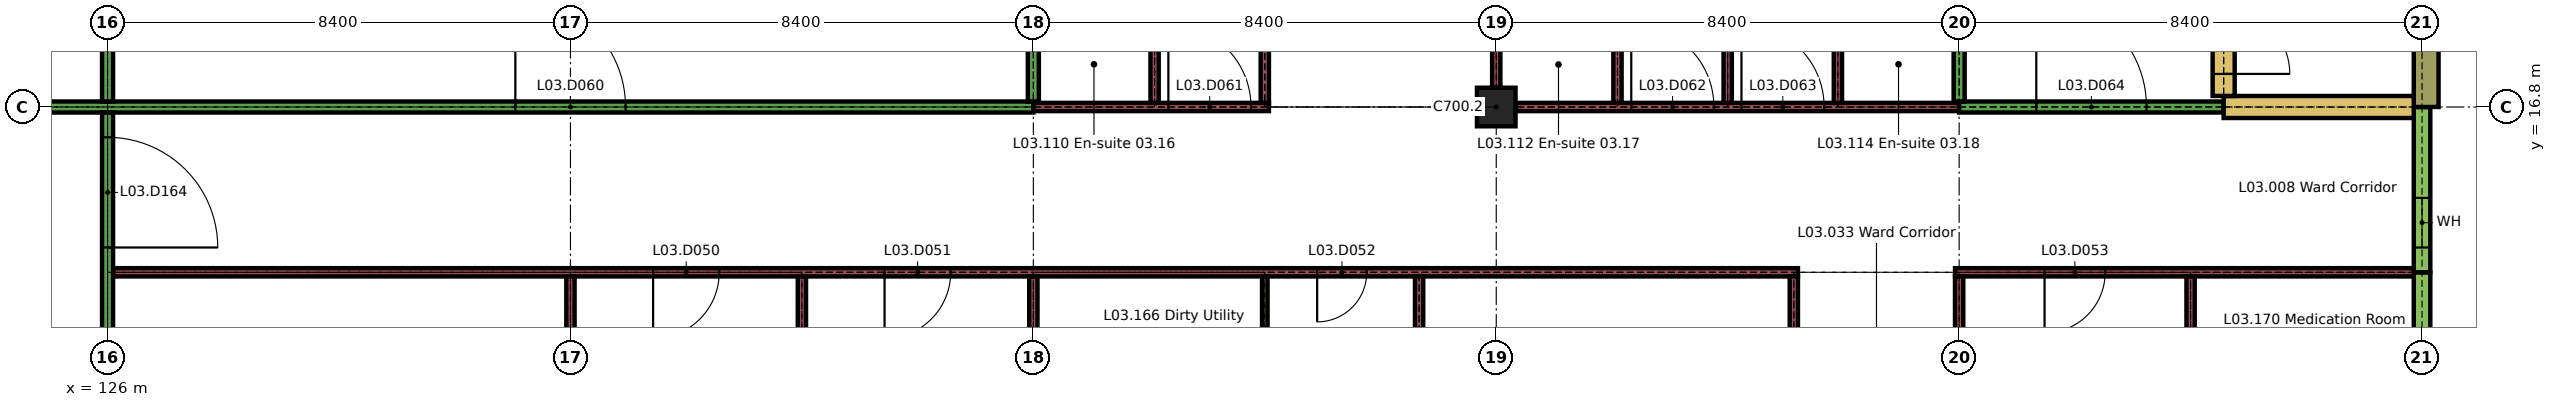
"""IFC4 building model, lengths in metres.
Left out: names, types, materials, properties, quantities, classifications, styles, units other than length and angle.
Written with IfcOpenShell. Run it as: python <this file> out.ifc"""

import sys

from ifc_helpers import new_model, si_unit, direction, frame, frame_2d, origin, origin_2d, place, context, subcontext, project, spatial, rectangle, extrude, element, fill, save


model = new_model("IFC4")
c1 = context("Model", 3, precision=1e-05, world=origin(), true_north=direction((0.0, 1.0)))
c2 = subcontext(c1, "Body", "Model", "MODEL_VIEW")
j1 = project(units=[si_unit("LENGTHUNIT", "METRE"), si_unit("PLANEANGLEUNIT", "RADIAN")], contexts=[c1])
p1 = place(None, origin())
s1 = spatial("IfcSite", under=j1, at=p1, CompositionType="ELEMENT")
p2 = place(p1, origin())
s2 = spatial("IfcBuilding", under=s1, at=p2, CompositionType="ELEMENT")
p3 = place(p2, frame((0.0, 0.0, 15.3)))
s3 = spatial("IfcBuildingStorey", under=s2, at=p3, CompositionType="ELEMENT", Elevation=15.3)
p4 = place(p3, frame((151.2, 16.8, 0.0), z_axis=(0.0, 0.0, 1.0), x_axis=(1.0, 0.0, 0.0)))
e1 = element("IfcColumn", 1, at=p4, inside=s3, PredefinedType="COLUMN", context=c2, shape_type="SweptSolid", body=[
    extrude(rectangle(XDim=0.7, YDim=0.7, at=origin_2d()), origin(), (0.0, 0.0, 1.0), 3.26),
])
p5 = place(p3, frame((168.0, 11.4, 0.0), z_axis=(0.0, 0.0, 1.0), x_axis=(0.0, 1.0, 0.0)))
e2 = element("IfcWall", 2, at=p5, inside=s3, PredefinedType="SOLIDWALL", context=c2, shape_type="SweptSolid", body=[
    extrude(rectangle(XDim=2.4, YDim=0.3, at=frame_2d((1.2, 0.0))), origin(), (0.0, 0.0, 1.0), 2.96),
])
p6 = place(p3, frame((168.0, 13.8, 0.0), z_axis=(0.0, 0.0, 1.0), x_axis=(0.0, 1.0, 0.0)))
e3 = element("IfcWall", 3, at=p6, inside=s3, PredefinedType="SOLIDWALL", context=c2, shape_type="SweptSolid", body=[
    extrude(rectangle(XDim=3.0, YDim=0.3, at=frame_2d((1.5, 0.0))), origin(), (0.0, 0.0, 1.0), 2.96),
])
p7 = place(p6, frame((0.45, 0.0, 0.9)))
e4 = element("IfcOpeningElement", 4, at=p7, cuts=e3, PredefinedType="OPENING", context=c2, shape_type="SweptSolid", body=[
    extrude(rectangle(XDim=0.9, YDim=1.5, at=frame_2d((0.45, 0.75))), frame((0.0, 0.16, 0.0), z_axis=(0.0, -1.0, 0.0), x_axis=(1.0, 0.0, 0.0)), (0.0, 0.0, 1.0), 0.32),
])
p8 = place(p3, frame((168.075, 16.8, 0.0), z_axis=(0.0, 0.0, 1.0), x_axis=(0.0, 1.0, 0.0)))
e5 = element("IfcWall", 5, at=p8, inside=s3, PredefinedType="SOLIDWALL", context=c2, shape_type="SweptSolid", body=[
    extrude(rectangle(XDim=3.15, YDim=0.45, at=frame_2d((1.575, 0.0))), origin(), (0.0, 0.0, 1.0), 3.26),
])
p9 = place(p3, frame((126.1, 13.8, 0.0), z_axis=(0.0, 0.0, 1.0), x_axis=(1.0, 0.0, 0.0)))
e6 = element("IfcWall", 6, at=p9, inside=s3, PredefinedType="PARTITIONING", context=c2, shape_type="SweptSolid", body=[
    extrude(rectangle(XDim=30.575, YDim=0.15, at=frame_2d((15.288, 0.0))), origin(), (0.0, 0.0, 1.0), 3.26),
])
p10 = place(p9, frame((9.8, 0.0, 0.0)))
e7 = element("IfcOpeningElement", 7, at=p10, cuts=e6, PredefinedType="OPENING", context=c2, shape_type="SweptSolid", body=[
    extrude(rectangle(XDim=1.2, YDim=2.1, at=frame_2d((0.6, 1.05))), frame((0.0, 0.085, 0.0), z_axis=(0.0, -1.0, 0.0), x_axis=(1.0, 0.0, 0.0)), (0.0, 0.0, 1.0), 0.17),
])
p11 = place(p9, frame((14.0, 0.0, 0.0)))
e8 = element("IfcOpeningElement", 8, at=p11, cuts=e6, PredefinedType="OPENING", context=c2, shape_type="SweptSolid", body=[
    extrude(rectangle(XDim=1.2, YDim=2.1, at=frame_2d((0.6, 1.05))), frame((0.0, 0.085, 0.0), z_axis=(0.0, -1.0, 0.0), x_axis=(1.0, 0.0, 0.0)), (0.0, 0.0, 1.0), 0.17),
])
p12 = place(p9, frame((21.85, 0.0, 0.0)))
e9 = element("IfcOpeningElement", 9, at=p12, cuts=e6, PredefinedType="OPENING", context=c2, shape_type="SweptSolid", body=[
    extrude(rectangle(XDim=0.9, YDim=2.1, at=frame_2d((0.45, 1.05))), frame((0.0, 0.085, 0.0), z_axis=(0.0, -1.0, 0.0), x_axis=(1.0, 0.0, 0.0)), (0.0, 0.0, 1.0), 0.17),
])
p13 = place(p3, frame((159.525, 13.8, 0.0), z_axis=(0.0, 0.0, 1.0), x_axis=(1.0, 0.0, 0.0)))
e10 = element("IfcWall", 10, at=p13, inside=s3, PredefinedType="PARTITIONING", context=c2, shape_type="SweptSolid", body=[
    extrude(rectangle(XDim=8.325, YDim=0.15, at=frame_2d((4.163, 0.0))), origin(), (0.0, 0.0, 1.0), 3.26),
])
p14 = place(p13, frame((1.625, 0.0, 0.0)))
e11 = element("IfcOpeningElement", 11, at=p14, cuts=e10, PredefinedType="OPENING", context=c2, shape_type="SweptSolid", body=[
    extrude(rectangle(XDim=1.1, YDim=2.1, at=frame_2d((0.55, 1.05))), frame((0.0, 0.085, 0.0), z_axis=(0.0, -1.0, 0.0), x_axis=(1.0, 0.0, 0.0)), (0.0, 0.0, 1.0), 0.17),
])
p15 = place(p3, frame((117.7, 16.8, 0.0), z_axis=(0.0, 0.0, 1.0), x_axis=(1.0, 0.0, 0.0)))
e12 = element("IfcWall", 12, at=p15, inside=s3, PredefinedType="PARTITIONING", context=c2, shape_type="SweptSolid", body=[
    extrude(rectangle(XDim=25.1, YDim=0.2, at=frame_2d((12.55, 0.0))), origin(), (0.0, 0.0, 1.0), 3.26),
])
p16 = place(p15, frame((3.3, 0.0, 0.0)))
e13 = element("IfcOpeningElement", 13, at=p16, cuts=e12, PredefinedType="OPENING", context=c2, shape_type="SweptSolid", body=[
    extrude(rectangle(XDim=1.7, YDim=2.4, at=frame_2d((0.85, 1.2))), frame((0.0, 0.11, 0.0), z_axis=(0.0, -1.0, 0.0), x_axis=(1.0, 0.0, 0.0)), (0.0, 0.0, 1.0), 0.22),
])
p17 = place(p15, frame((15.7, 0.0, 0.0)))
e14 = element("IfcOpeningElement", 14, at=p17, cuts=e12, PredefinedType="OPENING", context=c2, shape_type="SweptSolid", body=[
    extrude(rectangle(XDim=2.0, YDim=2.4, at=frame_2d((1.0, 1.2))), frame((0.0, 0.11, 0.0), z_axis=(0.0, -1.0, 0.0), x_axis=(1.0, 0.0, 0.0)), (0.0, 0.0, 1.0), 0.22),
])
p18 = place(p3, frame((142.8, 16.8, 0.0), z_axis=(0.0, 0.0, 1.0), x_axis=(1.0, 0.0, 0.0)))
e15 = element("IfcWall", 15, at=p18, inside=s3, PredefinedType="PARTITIONING", context=c2, shape_type="SweptSolid", body=[
    extrude(rectangle(XDim=4.275, YDim=0.15, at=frame_2d((2.137, 0.0))), origin(), (0.0, 0.0, 1.0), 3.26),
])
p19 = place(p18, frame((2.45, 0.0, 0.0)))
e16 = element("IfcOpeningElement", 16, at=p19, cuts=e15, PredefinedType="OPENING", context=c2, shape_type="SweptSolid", body=[
    extrude(rectangle(XDim=1.5, YDim=2.4, at=frame_2d((0.75, 1.2))), frame((0.0, 0.085, 0.0), z_axis=(0.0, -1.0, 0.0), x_axis=(1.0, 0.0, 0.0)), (0.0, 0.0, 1.0), 0.17),
])
p20 = place(p3, frame((151.55, 16.8, 0.0), z_axis=(0.0, 0.0, 1.0), x_axis=(1.0, 0.0, 0.0)))
e17 = element("IfcWall", 17, at=p20, inside=s3, PredefinedType="PARTITIONING", context=c2, shape_type="SweptSolid", body=[
    extrude(rectangle(XDim=8.05, YDim=0.15, at=frame_2d((4.025, 0.0))), origin(), (0.0, 0.0, 1.0), 3.26),
])
p21 = place(p20, frame((2.1, 0.0, 0.0)))
e18 = element("IfcOpeningElement", 18, at=p21, cuts=e17, PredefinedType="OPENING", context=c2, shape_type="SweptSolid", body=[
    extrude(rectangle(XDim=1.5, YDim=2.4, at=frame_2d((0.75, 1.2))), frame((0.0, 0.085, 0.0), z_axis=(0.0, -1.0, 0.0), x_axis=(1.0, 0.0, 0.0)), (0.0, 0.0, 1.0), 0.17),
])
p22 = place(p20, frame((4.1, 0.0, 0.0)))
e19 = element("IfcOpeningElement", 19, at=p22, cuts=e17, PredefinedType="OPENING", context=c2, shape_type="SweptSolid", body=[
    extrude(rectangle(XDim=1.5, YDim=2.4, at=frame_2d((0.75, 1.2))), frame((0.0, 0.085, 0.0), z_axis=(0.0, -1.0, 0.0), x_axis=(1.0, 0.0, 0.0)), (0.0, 0.0, 1.0), 0.17),
])
p23 = place(p3, frame((159.6, 16.8, 0.0), z_axis=(0.0, 0.0, 1.0), x_axis=(1.0, 0.0, 0.0)))
e20 = element("IfcWall", 20, at=p23, inside=s3, PredefinedType="PARTITIONING", context=c2, shape_type="SweptSolid", body=[
    extrude(rectangle(XDim=4.8, YDim=0.2, at=frame_2d((2.4, 0.0))), origin(), (0.0, 0.0, 1.0), 3.26),
])
p24 = place(p23, frame((1.4, 0.0, 0.0)))
e21 = element("IfcOpeningElement", 21, at=p24, cuts=e20, PredefinedType="OPENING", context=c2, shape_type="SweptSolid", body=[
    extrude(rectangle(XDim=2.0, YDim=2.4, at=frame_2d((1.0, 1.2))), frame((0.0, 0.11, 0.0), z_axis=(0.0, -1.0, 0.0), x_axis=(1.0, 0.0, 0.0)), (0.0, 0.0, 1.0), 0.22),
])
p25 = place(p3, frame((164.4, 16.8, 0.0), z_axis=(0.0, 0.0, 1.0), x_axis=(1.0, 0.0, 0.0)))
e22 = element("IfcWall", 22, at=p25, inside=s3, PredefinedType="SHEAR", context=c2, shape_type="SweptSolid", body=[
    extrude(rectangle(XDim=3.45, YDim=0.4, at=frame_2d((1.725, 0.0))), origin(), (0.0, 0.0, 1.0), 3.26),
])
p26 = place(p3, frame((126.0, 8.775, 0.0), z_axis=(0.0, 0.0, 1.0), x_axis=(0.0, 1.0, 0.0)))
e23 = element("IfcWall", 23, at=p26, inside=s3, PredefinedType="PARTITIONING", context=c2, shape_type="SweptSolid", body=[
    extrude(rectangle(XDim=7.925, YDim=0.2, at=frame_2d((3.962, 0.0))), origin(), (0.0, 0.0, 1.0), 3.26),
])
p27 = place(p26, frame((0.312, 0.0, 0.0)))
e24 = element("IfcOpeningElement", 24, at=p27, cuts=e23, PredefinedType="OPENING", context=c2, shape_type="SweptSolid", body=[
    extrude(rectangle(XDim=2.0, YDim=2.4, at=frame_2d((1.0, 1.2))), frame((0.0, 0.11, 0.0), z_axis=(0.0, -1.0, 0.0), x_axis=(1.0, 0.0, 0.0)), (0.0, 0.0, 1.0), 0.22),
])
p28 = place(p26, frame((5.475, 0.0, 0.0)))
e25 = element("IfcOpeningElement", 25, at=p28, cuts=e23, PredefinedType="OPENING", context=c2, shape_type="SweptSolid", body=[
    extrude(rectangle(XDim=2.0, YDim=2.4, at=frame_2d((1.0, 1.2))), frame((0.0, 0.11, 0.0), z_axis=(0.0, -1.0, 0.0), x_axis=(1.0, 0.0, 0.0)), (0.0, 0.0, 1.0), 0.22),
])
p29 = place(p3, frame((126.0, 16.9, 0.0), z_axis=(0.0, 0.0, 1.0), x_axis=(0.0, 1.0, 0.0)))
e26 = element("IfcWall", 26, at=p29, inside=s3, PredefinedType="PARTITIONING", context=c2, shape_type="SweptSolid", body=[
    extrude(rectangle(XDim=4.5, YDim=0.2, at=frame_2d((2.25, 0.0))), origin(), (0.0, 0.0, 1.0), 3.26),
])
for number, where, z_axis, x_axis in (
    (27, (134.4, 11.475, 0.0), (0.0, 0.0, 1.0), (0.0, 1.0, 0.0)),
    (28, (138.6, 11.475, 0.0), (0.0, 0.0, 1.0), (0.0, 1.0, 0.0)),
    (29, (142.8, 11.475, 0.0), (0.0, 0.0, 1.0), (0.0, 1.0, 0.0)),
):
    element("IfcWall", number, at=place(p3, frame(where, z_axis=z_axis, x_axis=x_axis)), inside=s3, PredefinedType="PARTITIONING", context=c2, shape_type="SweptSolid", body=[
        extrude(rectangle(XDim=2.25, YDim=0.15, at=frame_2d((1.125, 0.0))), origin(), (0.0, 0.0, 1.0), 3.26),
    ])
p30 = place(p3, frame((142.8, 16.9, 0.0), z_axis=(0.0, 0.0, 1.0), x_axis=(0.0, 1.0, 0.0)))
e30 = element("IfcWall", 30, at=p30, inside=s3, PredefinedType="PARTITIONING", context=c2, shape_type="SweptSolid", body=[
    extrude(rectangle(XDim=4.7, YDim=0.2, at=frame_2d((2.35, 0.0))), origin(), (0.0, 0.0, 1.0), 3.26),
])
p31 = place(p3, frame((145.0, 16.875, 0.0), z_axis=(0.0, 0.0, 1.0), x_axis=(0.0, 1.0, 0.0)))
e31 = element("IfcWall", 31, at=p31, inside=s3, PredefinedType="PARTITIONING", context=c2, shape_type="SweptSolid", body=[
    extrude(rectangle(XDim=2.25, YDim=0.15, at=frame_2d((1.125, 0.0))), origin(), (0.0, 0.0, 1.0), 3.26),
])
p32 = place(p3, frame((147.0, 11.475, 0.0), z_axis=(0.0, 0.0, 1.0), x_axis=(0.0, 1.0, 0.0)))
e32 = element("IfcWall", 32, at=p32, inside=s3, PredefinedType="PARTITIONING", context=c2, shape_type="SweptSolid", body=[
    extrude(rectangle(XDim=2.25, YDim=0.1, at=frame_2d((1.125, 0.0))), origin(), (0.0, 0.0, 1.0), 3.26),
])
p33 = place(p3, frame((147.0, 16.875, 0.0), z_axis=(0.0, 0.0, 1.0), x_axis=(0.0, 1.0, 0.0)))
e33 = element("IfcWall", 33, at=p33, inside=s3, PredefinedType="PARTITIONING", context=c2, shape_type="SweptSolid", body=[
    extrude(rectangle(XDim=8.175, YDim=0.15, at=frame_2d((4.087, 0.0))), origin(), (0.0, 0.0, 1.0), 3.26),
])
p34 = place(p3, frame((149.8, 11.475, 0.0), z_axis=(0.0, 0.0, 1.0), x_axis=(0.0, 1.0, 0.0)))
e34 = element("IfcWall", 34, at=p34, inside=s3, PredefinedType="PARTITIONING", context=c2, shape_type="SweptSolid", body=[
    extrude(rectangle(XDim=2.25, YDim=0.15, at=frame_2d((1.125, 0.0))), origin(), (0.0, 0.0, 1.0), 3.26),
])
p35 = place(p3, frame((151.2, 17.15, 0.0), z_axis=(0.0, 0.0, 1.0), x_axis=(0.0, 1.0, 0.0)))
e35 = element("IfcWall", 35, at=p35, inside=s3, PredefinedType="PARTITIONING", context=c2, shape_type="SweptSolid", body=[
    extrude(rectangle(XDim=7.7, YDim=0.15, at=frame_2d((3.85, 0.0))), origin(), (0.0, 0.0, 1.0), 3.26),
])
p36 = place(p3, frame((153.4, 16.875, 0.0), z_axis=(0.0, 0.0, 1.0), x_axis=(0.0, 1.0, 0.0)))
e36 = element("IfcWall", 36, at=p36, inside=s3, PredefinedType="PARTITIONING", context=c2, shape_type="SweptSolid", body=[
    extrude(rectangle(XDim=2.25, YDim=0.15, at=frame_2d((1.125, 0.0))), origin(), (0.0, 0.0, 1.0), 3.26),
])
p37 = place(p3, frame((155.4, 16.875, 0.0), z_axis=(0.0, 0.0, 1.0), x_axis=(0.0, 1.0, 0.0)))
e37 = element("IfcWall", 37, at=p37, inside=s3, PredefinedType="PARTITIONING", context=c2, shape_type="SweptSolid", body=[
    extrude(rectangle(XDim=8.175, YDim=0.15, at=frame_2d((4.087, 0.0))), origin(), (0.0, 0.0, 1.0), 3.26),
])
p38 = place(p3, frame((156.6, 11.4, 0.0), z_axis=(0.0, 0.0, 1.0), x_axis=(0.0, 1.0, 0.0)))
e38 = element("IfcWall", 38, at=p38, inside=s3, PredefinedType="PARTITIONING", context=c2, shape_type="SweptSolid", body=[
    extrude(rectangle(XDim=2.325, YDim=0.15, at=frame_2d((1.163, 0.0))), origin(), (0.0, 0.0, 1.0), 3.26),
])
for number, where, z_axis, x_axis in (
    (39, (157.4, 16.875, 0.0), (0.0, 0.0, 1.0), (0.0, 1.0, 0.0)),
    (40, (159.6, 11.475, 0.0), (0.0, 0.0, 1.0), (0.0, 1.0, 0.0)),
):
    element("IfcWall", number, at=place(p3, frame(where, z_axis=z_axis, x_axis=x_axis)), inside=s3, PredefinedType="PARTITIONING", context=c2, shape_type="SweptSolid", body=[
        extrude(rectangle(XDim=2.25, YDim=0.15, at=frame_2d((1.125, 0.0))), origin(), (0.0, 0.0, 1.0), 3.26),
    ])
p39 = place(p3, frame((159.6, 16.9, 0.0), z_axis=(0.0, 0.0, 1.0), x_axis=(0.0, 1.0, 0.0)))
e41 = element("IfcWall", 41, at=p39, inside=s3, PredefinedType="PARTITIONING", context=c2, shape_type="SweptSolid", body=[
    extrude(rectangle(XDim=8.15, YDim=0.2, at=frame_2d((4.075, 0.0))), origin(), (0.0, 0.0, 1.0), 3.26),
])
p40 = place(p3, frame((163.8, 11.475, 0.0), z_axis=(0.0, 0.0, 1.0), x_axis=(0.0, 1.0, 0.0)))
e42 = element("IfcWall", 42, at=p40, inside=s3, PredefinedType="PARTITIONING", context=c2, shape_type="SweptSolid", body=[
    extrude(rectangle(XDim=2.25, YDim=0.15, at=frame_2d((1.125, 0.0))), origin(), (0.0, 0.0, 1.0), 3.26),
])
p41 = place(p3, frame((164.4, 17.0, 0.0), z_axis=(0.0, 0.0, 1.0), x_axis=(0.0, 1.0, 0.0)))
e43 = element("IfcWall", 43, at=p41, inside=s3, PredefinedType="SHEAR", context=c2, shape_type="SweptSolid", body=[
    extrude(rectangle(XDim=8.05, YDim=0.4, at=frame_2d((4.025, 0.0))), origin(), (0.0, 0.0, 1.0), 3.26),
])
p42 = place(p41, frame((0.4, 0.0, 0.0)))
e44 = element("IfcOpeningElement", 44, at=p42, cuts=e43, PredefinedType="OPENING", context=c2, shape_type="SweptSolid", body=[
    extrude(rectangle(XDim=1.2, YDim=2.1, at=frame_2d((0.6, 1.05))), frame((0.0, 0.21, 0.0), z_axis=(0.0, -1.0, 0.0), x_axis=(1.0, 0.0, 0.0)), (0.0, 0.0, 1.0), 0.42),
])
p43 = place(p7, origin())
e45 = element("IfcWindow", 45, at=p43, inside=s3, PartitioningType="SINGLE_PANEL", PredefinedType="WINDOW", context=c2, shape_type="SweptSolid", body=[
    extrude(rectangle(XDim=0.9, YDim=1.5, at=frame_2d((0.45, 0.75))), frame((0.0, 0.03, 0.0), z_axis=(0.0, -1.0, 0.0), x_axis=(1.0, 0.0, 0.0)), (0.0, 0.0, 1.0), 0.06),
])
fill(e4, e45)
p44 = place(p10, origin())
e46 = element("IfcDoor", 46, at=p44, inside=s3, OperationType="SINGLE_SWING_LEFT", PredefinedType="DOOR", context=c2, shape_type="SweptSolid", body=[
    extrude(rectangle(XDim=1.2, YDim=2.1, at=frame_2d((0.6, 1.05))), frame((0.0, 0.025, 0.0), z_axis=(0.0, -1.0, 0.0), x_axis=(1.0, 0.0, 0.0)), (0.0, 0.0, 1.0), 0.05),
])
fill(e7, e46)
p45 = place(p11, origin())
e47 = element("IfcDoor", 47, at=p45, inside=s3, OperationType="SINGLE_SWING_LEFT", PredefinedType="DOOR", context=c2, shape_type="SweptSolid", body=[
    extrude(rectangle(XDim=1.2, YDim=2.1, at=frame_2d((0.6, 1.05))), frame((0.0, 0.025, 0.0), z_axis=(0.0, -1.0, 0.0), x_axis=(1.0, 0.0, 0.0)), (0.0, 0.0, 1.0), 0.05),
])
fill(e8, e47)
p46 = place(p12, origin())
e48 = element("IfcDoor", 48, at=p46, inside=s3, OperationType="SINGLE_SWING_LEFT", PredefinedType="DOOR", context=c2, shape_type="SweptSolid", body=[
    extrude(rectangle(XDim=0.9, YDim=2.1, at=frame_2d((0.45, 1.05))), frame((0.0, 0.02, 0.0), z_axis=(0.0, -1.0, 0.0), x_axis=(1.0, 0.0, 0.0)), (0.0, 0.0, 1.0), 0.04),
])
fill(e9, e48)
p47 = place(p14, origin())
e49 = element("IfcDoor", 49, at=p47, inside=s3, OperationType="SINGLE_SWING_LEFT", PredefinedType="DOOR", context=c2, shape_type="SweptSolid", body=[
    extrude(rectangle(XDim=1.1, YDim=2.1, at=frame_2d((0.55, 1.05))), frame((0.0, 0.025, 0.0), z_axis=(0.0, -1.0, 0.0), x_axis=(1.0, 0.0, 0.0)), (0.0, 0.0, 1.0), 0.05),
])
fill(e11, e49)
p48 = place(p17, origin())
e50 = element("IfcDoor", 50, at=p48, inside=s3, OperationType="SINGLE_SWING_RIGHT", PredefinedType="DOOR", context=c2, shape_type="SweptSolid", body=[
    extrude(rectangle(XDim=2.0, YDim=2.4, at=frame_2d((1.0, 1.2))), frame((0.0, 0.03, 0.0), z_axis=(0.0, -1.0, 0.0), x_axis=(1.0, 0.0, 0.0)), (0.0, 0.0, 1.0), 0.06),
])
fill(e14, e50)
p49 = place(p19, origin())
e51 = element("IfcDoor", 51, at=p49, inside=s3, OperationType="SINGLE_SWING_RIGHT", PredefinedType="DOOR", context=c2, shape_type="SweptSolid", body=[
    extrude(rectangle(XDim=1.5, YDim=2.4, at=frame_2d((0.75, 1.2))), frame((0.0, 0.03, 0.0), z_axis=(0.0, -1.0, 0.0), x_axis=(1.0, 0.0, 0.0)), (0.0, 0.0, 1.0), 0.06),
])
fill(e16, e51)
p50 = place(p21, origin())
e52 = element("IfcDoor", 52, at=p50, inside=s3, OperationType="SINGLE_SWING_RIGHT", PredefinedType="DOOR", context=c2, shape_type="SweptSolid", body=[
    extrude(rectangle(XDim=1.5, YDim=2.4, at=frame_2d((0.75, 1.2))), frame((0.0, 0.03, 0.0), z_axis=(0.0, -1.0, 0.0), x_axis=(1.0, 0.0, 0.0)), (0.0, 0.0, 1.0), 0.06),
])
fill(e18, e52)
p51 = place(p22, origin())
e53 = element("IfcDoor", 53, at=p51, inside=s3, OperationType="SINGLE_SWING_RIGHT", PredefinedType="DOOR", context=c2, shape_type="SweptSolid", body=[
    extrude(rectangle(XDim=1.5, YDim=2.4, at=frame_2d((0.75, 1.2))), frame((0.0, 0.03, 0.0), z_axis=(0.0, -1.0, 0.0), x_axis=(1.0, 0.0, 0.0)), (0.0, 0.0, 1.0), 0.06),
])
fill(e19, e53)
p52 = place(p24, origin())
e54 = element("IfcDoor", 54, at=p52, inside=s3, OperationType="SINGLE_SWING_RIGHT", PredefinedType="DOOR", context=c2, shape_type="SweptSolid", body=[
    extrude(rectangle(XDim=2.0, YDim=2.4, at=frame_2d((1.0, 1.2))), frame((0.0, 0.03, 0.0), z_axis=(0.0, -1.0, 0.0), x_axis=(1.0, 0.0, 0.0)), (0.0, 0.0, 1.0), 0.06),
])
fill(e21, e54)
p53 = place(p28, origin())
e55 = element("IfcDoor", 55, at=p53, inside=s3, OperationType="SINGLE_SWING_LEFT", PredefinedType="DOOR", context=c2, shape_type="SweptSolid", body=[
    extrude(rectangle(XDim=2.0, YDim=2.4, at=frame_2d((1.0, 1.2))), frame((0.0, 0.03, 0.0), z_axis=(0.0, -1.0, 0.0), x_axis=(1.0, 0.0, 0.0)), (0.0, 0.0, 1.0), 0.06),
])
fill(e25, e55)
p54 = place(p42, origin())
e56 = element("IfcDoor", 56, at=p54, inside=s3, OperationType="SINGLE_SWING_LEFT", PredefinedType="DOOR", context=c2, shape_type="SweptSolid", body=[
    extrude(rectangle(XDim=1.2, YDim=2.1, at=frame_2d((0.6, 1.05))), frame((0.0, 0.025, 0.0), z_axis=(0.0, -1.0, 0.0), x_axis=(1.0, 0.0, 0.0)), (0.0, 0.0, 1.0), 0.05),
])
fill(e44, e56)
save(model, sys.argv[1])
